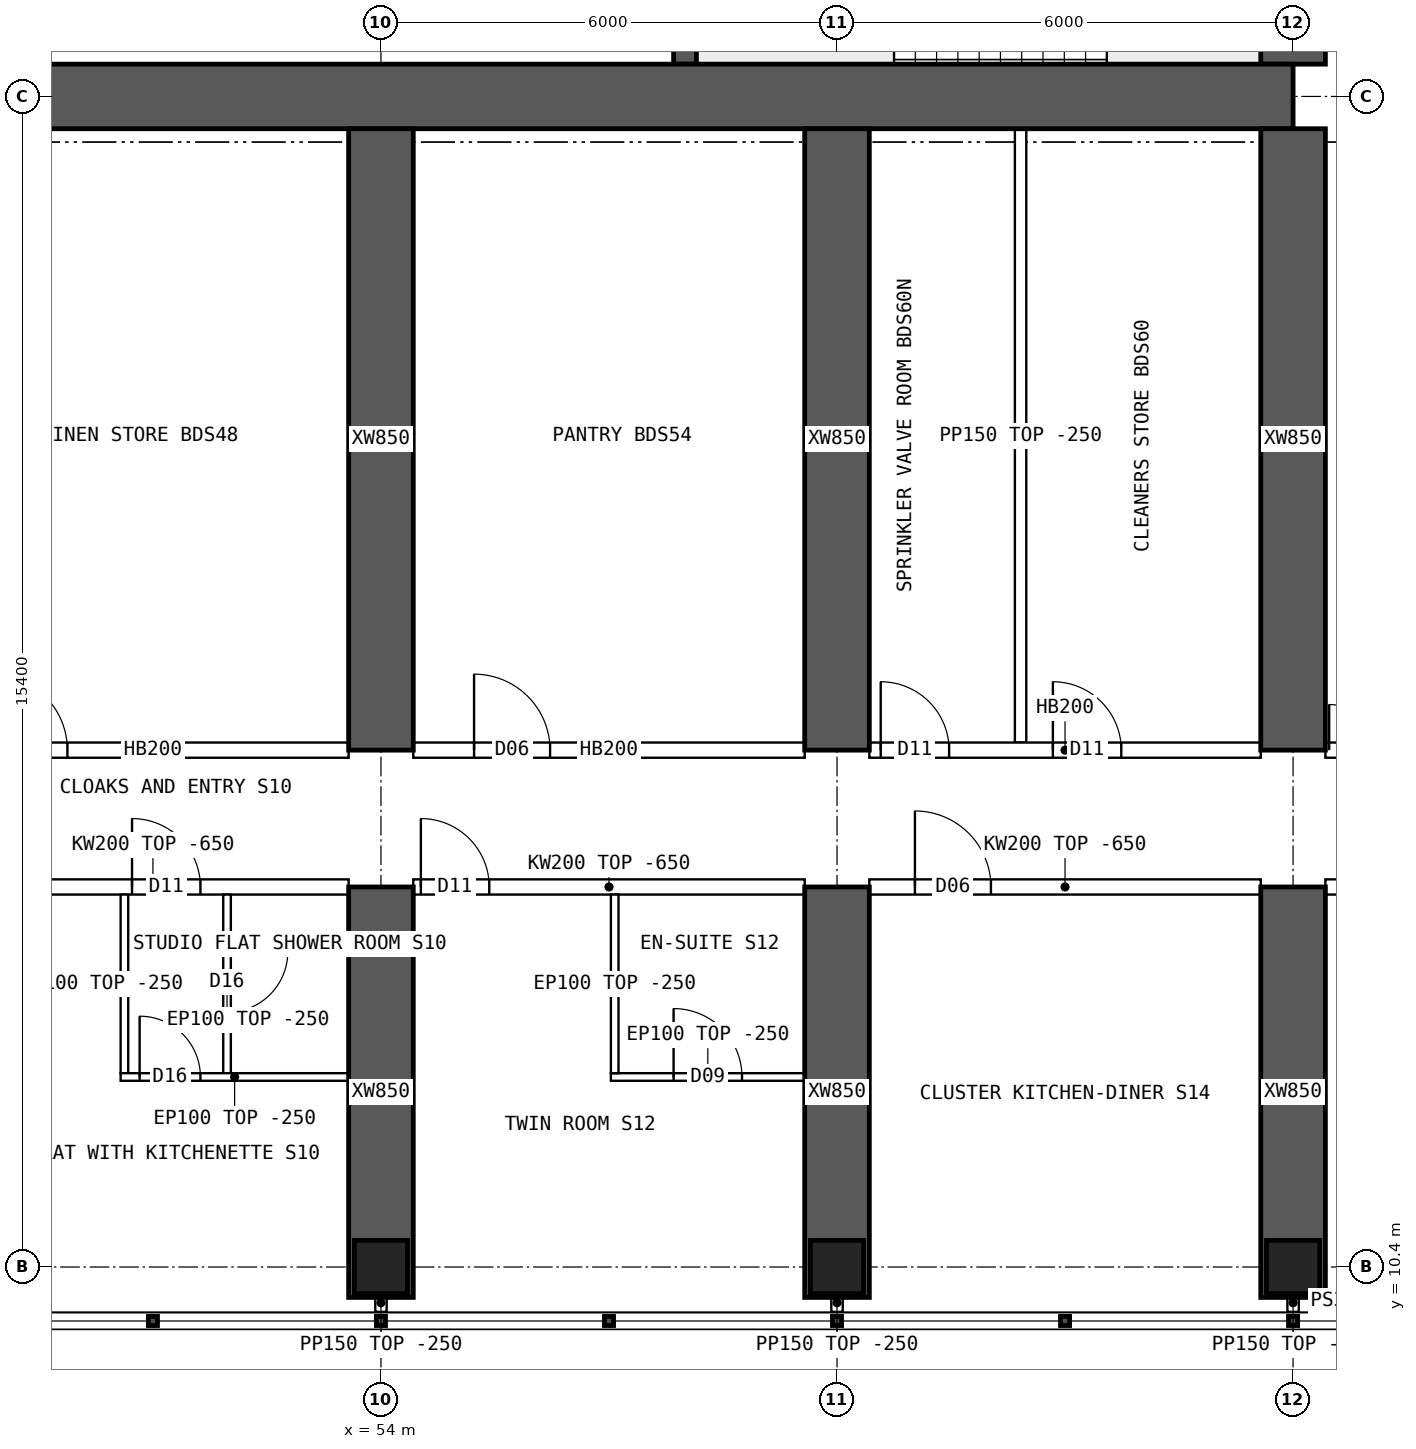
"""IFC4 building model, lengths in metres.
Left out: names, types, materials, properties, quantities, classifications, styles, units other than length and angle.
Written with IfcOpenShell. Run it as: python <this file> out.ifc"""

import sys

from ifc_helpers import new_model, si_unit, direction, frame, frame_2d, origin, origin_2d, place, context, subcontext, project, spatial, polyline, rectangle, hollow_rectangle, outline, extrude, element, fill, save


model = new_model("IFC4")
c1 = context("Model", 3, precision=1e-05, world=origin(), true_north=direction((0.0, 1.0)))
c2 = subcontext(c1, "Body", "Model", "MODEL_VIEW")
j1 = project(units=[si_unit("LENGTHUNIT", "METRE"), si_unit("PLANEANGLEUNIT", "RADIAN")], contexts=[c1])
p1 = place(None, origin())
s1 = spatial("IfcSite", under=j1, at=p1, CompositionType="ELEMENT")
p2 = place(p1, origin())
s2 = spatial("IfcBuilding", under=s1, at=p2, CompositionType="ELEMENT")
p3 = place(p2, frame((0.0, 0.0, 148.6)))
s3 = spatial("IfcBuildingStorey", under=s2, at=p3, CompositionType="ELEMENT", Elevation=148.6)
for number, where, z_axis, x_axis in (
    (1, (54.0, 10.4, 0.0), (0.0, 0.0, 1.0), (1.0, 0.0, 0.0)),
    (2, (60.0, 10.4, 0.0), (0.0, 0.0, 1.0), (1.0, 0.0, 0.0)),
    (3, (66.0, 10.4, 0.0), (0.0, 0.0, 1.0), (1.0, 0.0, 0.0)),
):
    element("IfcColumn", number, at=place(p3, frame(where, z_axis=z_axis, x_axis=x_axis)), inside=s3, PredefinedType="COLUMN", context=c2, shape_type="SweptSolid", body=[
        extrude(hollow_rectangle(XDim=0.7, YDim=0.7, WallThickness=0.07, at=origin_2d()), origin(), (0.0, 0.0, 1.0), 3.75),
    ])
p4 = place(p3, frame((18.0, 25.8, 0.0), z_axis=(0.0, 0.0, 1.0), x_axis=(1.0, 0.0, 0.0)))
e4 = element("IfcWall", 4, at=p4, inside=s3, PredefinedType="SHEAR", context=c2, shape_type="SweptSolid", body=[
    extrude(rectangle(XDim=48.0, YDim=0.85, at=frame_2d((24.0, 0.0))), origin(), (0.0, 0.0, 1.0), 3.75),
])
p5 = place(p3, frame((66.0, 26.225, 0.0), z_axis=(0.0, 0.0, 1.0), x_axis=(0.0, 1.0, 0.0)))
e5 = element("IfcWall", 5, at=p5, inside=s3, PredefinedType="SHEAR", context=c2, shape_type="SweptSolid", body=[
    extrude(rectangle(XDim=11.55, YDim=0.85, at=frame_2d((5.775, 0.0))), origin(), (0.0, 0.0, 1.0), 3.75),
])
p6 = place(p5, frame((5.075, 0.0, 0.0)))
e6 = element("IfcOpeningElement", 6, at=p6, cuts=e5, PredefinedType="OPENING", context=c2, shape_type="SweptSolid", body=[
    extrude(rectangle(XDim=1.2, YDim=2.1, at=frame_2d((0.6, 1.05))), frame((0.0, 0.435, 0.0), z_axis=(0.0, -1.0, 0.0), x_axis=(1.0, 0.0, 0.0)), (0.0, 0.0, 1.0), 0.87),
])
p7 = place(p3, frame((58.0, 26.225, 0.0), z_axis=(0.0, 0.0, 1.0), x_axis=(0.0, 1.0, 0.0)))
e7 = element("IfcWall", 7, at=p7, inside=s3, PredefinedType="SHEAR", context=c2, shape_type="SweptSolid", body=[
    extrude(rectangle(XDim=4.025, YDim=0.3, at=frame_2d((2.012, 0.0))), origin(), (0.0, 0.0, 1.0), 3.75),
])
p8 = place(p3, frame((54.0, 10.0, 0.0), z_axis=(0.0, 0.0, 1.0), x_axis=(0.0, 1.0, 0.0)))
e8 = element("IfcWall", 8, at=p8, inside=s3, PredefinedType="SHEAR", context=c2, shape_type="SweptSolid", body=[
    extrude(rectangle(XDim=5.4, YDim=0.85, at=frame_2d((2.7, 0.0))), origin(), (0.0, 0.0, 1.0), 3.75),
])
p9 = place(p3, frame((54.0, 17.2, 0.0), z_axis=(0.0, 0.0, 1.0), x_axis=(0.0, 1.0, 0.0)))
e9 = element("IfcWall", 9, at=p9, inside=s3, PredefinedType="SHEAR", context=c2, shape_type="SweptSolid", body=[
    extrude(rectangle(XDim=8.175, YDim=0.85, at=frame_2d((4.087, 0.0))), origin(), (0.0, 0.0, 1.0), 3.75),
])
p10 = place(p3, frame((60.0, 10.0, 0.0), z_axis=(0.0, 0.0, 1.0), x_axis=(0.0, 1.0, 0.0)))
e10 = element("IfcWall", 10, at=p10, inside=s3, PredefinedType="SHEAR", context=c2, shape_type="SweptSolid", body=[
    extrude(rectangle(XDim=5.4, YDim=0.85, at=frame_2d((2.7, 0.0))), origin(), (0.0, 0.0, 1.0), 3.75),
])
p11 = place(p3, frame((60.0, 17.2, 0.0), z_axis=(0.0, 0.0, 1.0), x_axis=(0.0, 1.0, 0.0)))
e11 = element("IfcWall", 11, at=p11, inside=s3, PredefinedType="SHEAR", context=c2, shape_type="SweptSolid", body=[
    extrude(rectangle(XDim=8.175, YDim=0.85, at=frame_2d((4.087, 0.0))), origin(), (0.0, 0.0, 1.0), 3.75),
])
p12 = place(p3, frame((66.0, 10.0, 0.0), z_axis=(0.0, 0.0, 1.0), x_axis=(0.0, 1.0, 0.0)))
e12 = element("IfcWall", 12, at=p12, inside=s3, PredefinedType="SHEAR", context=c2, shape_type="SweptSolid", body=[
    extrude(rectangle(XDim=5.4, YDim=0.85, at=frame_2d((2.7, 0.0))), origin(), (0.0, 0.0, 1.0), 3.75),
])
p13 = place(p3, frame((66.0, 17.2, 0.0), z_axis=(0.0, 0.0, 1.0), x_axis=(0.0, 1.0, 0.0)))
e13 = element("IfcWall", 13, at=p13, inside=s3, PredefinedType="SHEAR", context=c2, shape_type="SweptSolid", body=[
    extrude(rectangle(XDim=8.175, YDim=0.85, at=frame_2d((4.087, 0.0))), origin(), (0.0, 0.0, 1.0), 3.75),
])
p14 = place(p3, frame((66.8, 9.95, 0.0), z_axis=(0.0, 0.0, 1.0), x_axis=(-1.0, 0.0, 0.0)))
e14 = element("IfcWall", 14, at=p14, inside=s3, PredefinedType="SOLIDWALL", context=c2, shape_type="SweptSolid", body=[
    extrude(rectangle(XDim=0.375, YDim=0.3, at=frame_2d((0.188, 0.0))), origin(), (0.0, 0.0, 1.0), 3.5),
])
p15 = place(p3, frame((48.425, 15.4, 0.0), z_axis=(0.0, 0.0, 1.0), x_axis=(1.0, 0.0, 0.0)))
e15 = element("IfcWall", 15, at=p15, inside=s3, PredefinedType="SOLIDWALL", context=c2, shape_type="SweptSolid", body=[
    extrude(outline(polyline([(0.0, 0.0), (5.15, 0.0), (5.15, 3.1), (0.0, 3.1), (0.0, 0.0)])), frame((0.0, 0.1, 0.0), z_axis=(0.0, -1.0, 0.0), x_axis=(1.0, 0.0, 0.0)), (0.0, 0.0, 1.0), 0.2),
])
p16 = place(p15, frame((2.3, 0.0, 0.0)))
e16 = element("IfcOpeningElement", 16, at=p16, cuts=e15, PredefinedType="OPENING", context=c2, shape_type="SweptSolid", body=[
    extrude(rectangle(XDim=0.9, YDim=2.1, at=frame_2d((0.45, 1.05))), frame((0.0, 0.11, 0.0), z_axis=(0.0, -1.0, 0.0), x_axis=(1.0, 0.0, 0.0)), (0.0, 0.0, 1.0), 0.22),
])
p17 = place(p3, frame((48.425, 17.2, 0.0), z_axis=(0.0, 0.0, 1.0), x_axis=(1.0, 0.0, 0.0)))
e17 = element("IfcWall", 17, at=p17, inside=s3, PredefinedType="SOLIDWALL", context=c2, shape_type="SweptSolid", body=[
    extrude(rectangle(XDim=5.15, YDim=0.2, at=frame_2d((2.575, 0.0))), origin(), (0.0, 0.0, 1.0), 3.5),
])
p18 = place(p17, frame((0.45, 0.0, 0.0)))
e18 = element("IfcOpeningElement", 18, at=p18, cuts=e17, PredefinedType="OPENING", context=c2, shape_type="SweptSolid", body=[
    extrude(rectangle(XDim=1.0, YDim=2.1, at=frame_2d((0.5, 1.05))), frame((0.0, 0.11, 0.0), z_axis=(0.0, -1.0, 0.0), x_axis=(1.0, 0.0, 0.0)), (0.0, 0.0, 1.0), 0.22),
])
p19 = place(p3, frame((54.425, 15.4, 0.0), z_axis=(0.0, 0.0, 1.0), x_axis=(1.0, 0.0, 0.0)))
e19 = element("IfcWall", 19, at=p19, inside=s3, PredefinedType="SOLIDWALL", context=c2, shape_type="SweptSolid", body=[
    extrude(outline(polyline([(0.0, 0.0), (5.15, 0.0), (5.15, 3.1), (0.0, 3.1), (0.0, 0.0)])), frame((0.0, 0.1, 0.0), z_axis=(0.0, -1.0, 0.0), x_axis=(1.0, 0.0, 0.0)), (0.0, 0.0, 1.0), 0.2),
])
p20 = place(p19, frame((0.1, 0.0, 0.0)))
e20 = element("IfcOpeningElement", 20, at=p20, cuts=e19, PredefinedType="OPENING", context=c2, shape_type="SweptSolid", body=[
    extrude(rectangle(XDim=0.9, YDim=2.1, at=frame_2d((0.45, 1.05))), frame((0.0, 0.11, 0.0), z_axis=(0.0, -1.0, 0.0), x_axis=(1.0, 0.0, 0.0)), (0.0, 0.0, 1.0), 0.22),
])
p21 = place(p3, frame((54.425, 17.2, 0.0), z_axis=(0.0, 0.0, 1.0), x_axis=(1.0, 0.0, 0.0)))
e21 = element("IfcWall", 21, at=p21, inside=s3, PredefinedType="SOLIDWALL", context=c2, shape_type="SweptSolid", body=[
    extrude(rectangle(XDim=5.15, YDim=0.2, at=frame_2d((2.575, 0.0))), origin(), (0.0, 0.0, 1.0), 3.5),
])
p22 = place(p21, frame((0.8, 0.0, 0.0)))
e22 = element("IfcOpeningElement", 22, at=p22, cuts=e21, PredefinedType="OPENING", context=c2, shape_type="SweptSolid", body=[
    extrude(rectangle(XDim=1.0, YDim=2.1, at=frame_2d((0.5, 1.05))), frame((0.0, 0.11, 0.0), z_axis=(0.0, -1.0, 0.0), x_axis=(1.0, 0.0, 0.0)), (0.0, 0.0, 1.0), 0.22),
])
p23 = place(p3, frame((60.425, 15.4, 0.0), z_axis=(0.0, 0.0, 1.0), x_axis=(1.0, 0.0, 0.0)))
e23 = element("IfcWall", 23, at=p23, inside=s3, PredefinedType="SOLIDWALL", context=c2, shape_type="SweptSolid", body=[
    extrude(outline(polyline([(0.0, 0.0), (5.15, 0.0), (5.15, 3.1), (0.0, 3.1), (0.0, 0.0)])), frame((0.0, 0.1, 0.0), z_axis=(0.0, -1.0, 0.0), x_axis=(1.0, 0.0, 0.0)), (0.0, 0.0, 1.0), 0.2),
])
p24 = place(p23, frame((0.6, 0.0, 0.0)))
e24 = element("IfcOpeningElement", 24, at=p24, cuts=e23, PredefinedType="OPENING", context=c2, shape_type="SweptSolid", body=[
    extrude(rectangle(XDim=1.0, YDim=2.1, at=frame_2d((0.5, 1.05))), frame((0.0, 0.11, 0.0), z_axis=(0.0, -1.0, 0.0), x_axis=(1.0, 0.0, 0.0)), (0.0, 0.0, 1.0), 0.22),
])
p25 = place(p3, frame((60.425, 17.2, 0.0), z_axis=(0.0, 0.0, 1.0), x_axis=(1.0, 0.0, 0.0)))
e25 = element("IfcWall", 25, at=p25, inside=s3, PredefinedType="SOLIDWALL", context=c2, shape_type="SweptSolid", body=[
    extrude(rectangle(XDim=5.15, YDim=0.2, at=frame_2d((2.575, 0.0))), origin(), (0.0, 0.0, 1.0), 3.5),
])
p26 = place(p25, frame((0.15, 0.0, 0.0)))
e26 = element("IfcOpeningElement", 26, at=p26, cuts=e25, PredefinedType="OPENING", context=c2, shape_type="SweptSolid", body=[
    extrude(rectangle(XDim=0.9, YDim=2.1, at=frame_2d((0.45, 1.05))), frame((0.0, 0.11, 0.0), z_axis=(0.0, -1.0, 0.0), x_axis=(1.0, 0.0, 0.0)), (0.0, 0.0, 1.0), 0.22),
])
p27 = place(p25, frame((2.415, 0.0, 0.0)))
e27 = element("IfcOpeningElement", 27, at=p27, cuts=e25, PredefinedType="OPENING", context=c2, shape_type="SweptSolid", body=[
    extrude(rectangle(XDim=0.9, YDim=2.1, at=frame_2d((0.45, 1.05))), frame((0.0, 0.11, 0.0), z_axis=(0.0, -1.0, 0.0), x_axis=(1.0, 0.0, 0.0)), (0.0, 0.0, 1.0), 0.22),
])
p28 = place(p3, frame((66.425, 15.4, 0.0), z_axis=(0.0, 0.0, 1.0), x_axis=(1.0, 0.0, 0.0)))
e28 = element("IfcWall", 28, at=p28, inside=s3, PredefinedType="SOLIDWALL", context=c2, shape_type="SweptSolid", body=[
    extrude(rectangle(XDim=1.975, YDim=0.2, at=frame_2d((0.987, 0.0))), origin(), (0.0, 0.0, 1.0), 3.5),
])
p29 = place(p28, frame((0.2, 0.0, 0.0)))
e29 = element("IfcOpeningElement", 29, at=p29, cuts=e28, PredefinedType="OPENING", context=c2, shape_type="SweptSolid", body=[
    extrude(rectangle(XDim=0.9, YDim=2.1, at=frame_2d((0.45, 1.05))), frame((0.0, 0.11, 0.0), z_axis=(0.0, -1.0, 0.0), x_axis=(1.0, 0.0, 0.0)), (0.0, 0.0, 1.0), 0.22),
])
p30 = place(p3, frame((66.425, 17.2, 0.0), z_axis=(0.0, 0.0, 1.0), x_axis=(1.0, 0.0, 0.0)))
e30 = element("IfcWall", 30, at=p30, inside=s3, PredefinedType="SOLIDWALL", context=c2, shape_type="SweptSolid", body=[
    extrude(rectangle(XDim=1.975, YDim=0.2, at=frame_2d((0.987, 0.0))), origin(), (0.0, 0.0, 1.0), 3.5),
])
p31 = place(p30, frame((0.05, 0.0, 0.0)))
e31 = element("IfcOpeningElement", 31, at=p31, cuts=e30, PredefinedType="OPENING", context=c2, shape_type="SweptSolid", body=[
    extrude(rectangle(XDim=1.2, YDim=2.1, at=frame_2d((0.6, 1.05))), frame((0.0, 0.11, 0.0), z_axis=(0.0, -1.0, 0.0), x_axis=(1.0, 0.0, 0.0)), (0.0, 0.0, 1.0), 0.22),
])
p32 = place(p3, frame((53.575, 12.9, 0.0), z_axis=(0.0, 0.0, 1.0), x_axis=(-1.0, 0.0, 0.0)))
e32 = element("IfcWall", 32, at=p32, inside=s3, PredefinedType="PARTITIONING", context=c2, shape_type="SweptSolid", body=[
    extrude(rectangle(XDim=3.0, YDim=0.1, at=frame_2d((1.5, 0.0))), origin(), (0.0, 0.0, 1.0), 3.5),
])
p33 = place(p32, frame((1.95, 0.0, 0.0)))
e33 = element("IfcOpeningElement", 33, at=p33, cuts=e32, PredefinedType="OPENING", context=c2, shape_type="SweptSolid", body=[
    extrude(rectangle(XDim=0.8, YDim=2.1, at=frame_2d((0.4, 1.05))), frame((0.0, 0.06, 0.0), z_axis=(0.0, -1.0, 0.0), x_axis=(1.0, 0.0, 0.0)), (0.0, 0.0, 1.0), 0.12),
])
p34 = place(p3, frame((50.625, 12.95, 0.0), z_axis=(0.0, 0.0, 1.0), x_axis=(0.0, 1.0, 0.0)))
e34 = element("IfcWall", 34, at=p34, inside=s3, PredefinedType="PARTITIONING", context=c2, shape_type="SweptSolid", body=[
    extrude(outline(polyline([(0.0, 0.0), (2.35, 0.0), (2.35, 3.1), (2.302, 3.1), (2.3, 3.5), (0.0, 3.5), (0.0, 0.0)])), frame((0.0, 0.05, 0.0), z_axis=(0.0, -1.0, 0.0), x_axis=(1.0, 0.0, 0.0)), (0.0, 0.0, 1.0), 0.1),
])
p35 = place(p3, frame((51.975, 12.95, 0.0), z_axis=(0.0, 0.0, 1.0), x_axis=(0.0, 1.0, 0.0)))
e35 = element("IfcWall", 35, at=p35, inside=s3, PredefinedType="PARTITIONING", context=c2, shape_type="SweptSolid", body=[
    extrude(outline(polyline([(0.0, 0.0), (2.35, 0.0), (2.35, 3.1), (2.302, 3.1), (2.3, 3.5), (0.0, 3.5), (0.0, 0.0)])), frame((0.0, 0.05, 0.0), z_axis=(0.0, -1.0, 0.0), x_axis=(1.0, 0.0, 0.0)), (0.0, 0.0, 1.0), 0.1),
])
p36 = place(p35, frame((0.8, 0.0, 0.0)))
e36 = element("IfcOpeningElement", 36, at=p36, cuts=e35, PredefinedType="OPENING", context=c2, shape_type="SweptSolid", body=[
    extrude(rectangle(XDim=0.8, YDim=2.1, at=frame_2d((0.4, 1.05))), frame((0.0, 0.06, 0.0), z_axis=(0.0, -1.0, 0.0), x_axis=(1.0, 0.0, 0.0)), (0.0, 0.0, 1.0), 0.12),
])
p37 = place(p3, frame((59.575, 12.9, 0.0), z_axis=(0.0, 0.0, 1.0), x_axis=(-1.0, 0.0, 0.0)))
e37 = element("IfcWall", 37, at=p37, inside=s3, PredefinedType="PARTITIONING", context=c2, shape_type="SweptSolid", body=[
    extrude(rectangle(XDim=2.55, YDim=0.1, at=frame_2d((1.275, 0.0))), origin(), (0.0, 0.0, 1.0), 3.5),
])
p38 = place(p37, frame((0.825, 0.0, 0.0)))
e38 = element("IfcOpeningElement", 38, at=p38, cuts=e37, PredefinedType="OPENING", context=c2, shape_type="SweptSolid", body=[
    extrude(rectangle(XDim=0.9, YDim=2.1, at=frame_2d((0.45, 1.05))), frame((0.0, 0.06, 0.0), z_axis=(0.0, -1.0, 0.0), x_axis=(1.0, 0.0, 0.0)), (0.0, 0.0, 1.0), 0.12),
])
p39 = place(p3, frame((57.075, 12.95, 0.0), z_axis=(0.0, 0.0, 1.0), x_axis=(0.0, 1.0, 0.0)))
e39 = element("IfcWall", 39, at=p39, inside=s3, PredefinedType="PARTITIONING", context=c2, shape_type="SweptSolid", body=[
    extrude(outline(polyline([(0.0, 0.0), (2.35, 0.0), (2.35, 3.1), (2.302, 3.1), (2.3, 3.5), (0.0, 3.5), (0.0, 0.0)])), frame((0.0, 0.05, 0.0), z_axis=(0.0, -1.0, 0.0), x_axis=(1.0, 0.0, 0.0)), (0.0, 0.0, 1.0), 0.1),
])
p40 = place(p3, frame((62.415, 17.3, 0.0), z_axis=(0.0, 0.0, 1.0), x_axis=(0.0, 1.0, 0.0)))
e40 = element("IfcWall", 40, at=p40, inside=s3, PredefinedType="PARTITIONING", context=c2, shape_type="SweptSolid", body=[
    extrude(rectangle(XDim=8.075, YDim=0.15, at=frame_2d((4.038, 0.0))), origin(), (0.0, 0.0, 1.0), 3.5),
])
for number, where, z_axis, x_axis in (
    (41, (54.0, 10.05, 0.0), (0.0, 0.0, 1.0), (0.0, -1.0, 0.0)),
    (42, (60.0, 10.05, 0.0), (0.0, 0.0, 1.0), (0.0, -1.0, 0.0)),
    (43, (66.0, 10.05, 0.0), (0.0, 0.0, 1.0), (0.0, -1.0, 0.0)),
):
    element("IfcWall", number, at=place(p3, frame(where, z_axis=z_axis, x_axis=x_axis)), inside=s3, PredefinedType="PARTITIONING", context=c2, shape_type="SweptSolid", body=[
        extrude(rectangle(XDim=0.24, YDim=0.15, at=frame_2d((0.12, 0.0))), origin(), (0.0, 0.0, 1.0), 3.5),
    ])
p41 = place(p31, origin())
e44 = element("IfcDoor", 44, at=p41, inside=s3, OperationType="DOUBLE_DOOR_SINGLE_SWING", PredefinedType="DOOR", context=c2, shape_type="SweptSolid", body=[
    extrude(rectangle(XDim=1.2, YDim=2.1, at=frame_2d((0.6, 1.05))), frame((0.0, 0.025, 0.0), z_axis=(0.0, -1.0, 0.0), x_axis=(1.0, 0.0, 0.0)), (0.0, 0.0, 1.0), 0.05),
])
fill(e31, e44)
p42 = place(p33, origin())
e45 = element("IfcDoor", 45, at=p42, inside=s3, OperationType="SINGLE_SWING_RIGHT", PredefinedType="DOOR", context=c2, shape_type="SweptSolid", body=[
    extrude(rectangle(XDim=0.8, YDim=2.1, at=frame_2d((0.4, 1.05))), frame((0.0, 0.025, 0.0), z_axis=(0.0, -1.0, 0.0), x_axis=(1.0, 0.0, 0.0)), (0.0, 0.0, 1.0), 0.05),
])
fill(e33, e45)
p43 = place(p36, origin())
e46 = element("IfcDoor", 46, at=p43, inside=s3, OperationType="SINGLE_SWING_RIGHT", PredefinedType="DOOR", context=c2, shape_type="SweptSolid", body=[
    extrude(rectangle(XDim=0.8, YDim=2.1, at=frame_2d((0.4, 1.05))), frame((0.0, 0.025, 0.0), z_axis=(0.0, -1.0, 0.0), x_axis=(1.0, 0.0, 0.0)), (0.0, 0.0, 1.0), 0.05),
])
fill(e36, e46)
p44 = place(p16, origin())
e47 = element("IfcDoor", 47, at=p44, inside=s3, OperationType="SINGLE_SWING_LEFT", PredefinedType="DOOR", context=c2, shape_type="SweptSolid", body=[
    extrude(rectangle(XDim=0.9, YDim=2.1, at=frame_2d((0.45, 1.05))), frame((0.0, 0.025, 0.0), z_axis=(0.0, -1.0, 0.0), x_axis=(1.0, 0.0, 0.0)), (0.0, 0.0, 1.0), 0.05),
])
fill(e16, e47)
p45 = place(p38, origin())
e48 = element("IfcDoor", 48, at=p45, inside=s3, OperationType="SINGLE_SWING_RIGHT", PredefinedType="DOOR", context=c2, shape_type="SweptSolid", body=[
    extrude(rectangle(XDim=0.9, YDim=2.1, at=frame_2d((0.45, 1.05))), frame((0.0, 0.025, 0.0), z_axis=(0.0, -1.0, 0.0), x_axis=(1.0, 0.0, 0.0)), (0.0, 0.0, 1.0), 0.05),
])
fill(e38, e48)
p46 = place(p20, origin())
e49 = element("IfcDoor", 49, at=p46, inside=s3, OperationType="SINGLE_SWING_LEFT", PredefinedType="DOOR", context=c2, shape_type="SweptSolid", body=[
    extrude(rectangle(XDim=0.9, YDim=2.1, at=frame_2d((0.45, 1.05))), frame((0.0, 0.025, 0.0), z_axis=(0.0, -1.0, 0.0), x_axis=(1.0, 0.0, 0.0)), (0.0, 0.0, 1.0), 0.05),
])
fill(e20, e49)
p47 = place(p24, origin())
e50 = element("IfcDoor", 50, at=p47, inside=s3, OperationType="SINGLE_SWING_LEFT", PredefinedType="DOOR", context=c2, shape_type="SweptSolid", body=[
    extrude(rectangle(XDim=1.0, YDim=2.1, at=frame_2d((0.5, 1.05))), frame((0.0, 0.025, 0.0), z_axis=(0.0, -1.0, 0.0), x_axis=(1.0, 0.0, 0.0)), (0.0, 0.0, 1.0), 0.05),
])
fill(e24, e50)
p48 = place(p18, origin())
e51 = element("IfcDoor", 51, at=p48, inside=s3, OperationType="SINGLE_SWING_LEFT", PredefinedType="DOOR", context=c2, shape_type="SweptSolid", body=[
    extrude(rectangle(XDim=1.0, YDim=2.1, at=frame_2d((0.5, 1.05))), frame((0.0, 0.025, 0.0), z_axis=(0.0, -1.0, 0.0), x_axis=(1.0, 0.0, 0.0)), (0.0, 0.0, 1.0), 0.05),
])
fill(e18, e51)
p49 = place(p22, origin())
e52 = element("IfcDoor", 52, at=p49, inside=s3, OperationType="SINGLE_SWING_LEFT", PredefinedType="DOOR", context=c2, shape_type="SweptSolid", body=[
    extrude(rectangle(XDim=1.0, YDim=2.1, at=frame_2d((0.5, 1.05))), frame((0.0, 0.025, 0.0), z_axis=(0.0, -1.0, 0.0), x_axis=(1.0, 0.0, 0.0)), (0.0, 0.0, 1.0), 0.05),
])
fill(e22, e52)
p50 = place(p26, origin())
e53 = element("IfcDoor", 53, at=p50, inside=s3, OperationType="SINGLE_SWING_LEFT", PredefinedType="DOOR", context=c2, shape_type="SweptSolid", body=[
    extrude(rectangle(XDim=0.9, YDim=2.1, at=frame_2d((0.45, 1.05))), frame((0.0, 0.025, 0.0), z_axis=(0.0, -1.0, 0.0), x_axis=(1.0, 0.0, 0.0)), (0.0, 0.0, 1.0), 0.05),
])
fill(e26, e53)
p51 = place(p27, origin())
e54 = element("IfcDoor", 54, at=p51, inside=s3, OperationType="SINGLE_SWING_LEFT", PredefinedType="DOOR", context=c2, shape_type="SweptSolid", body=[
    extrude(rectangle(XDim=0.9, YDim=2.1, at=frame_2d((0.45, 1.05))), frame((0.0, 0.025, 0.0), z_axis=(0.0, -1.0, 0.0), x_axis=(1.0, 0.0, 0.0)), (0.0, 0.0, 1.0), 0.05),
])
fill(e27, e54)
save(model, sys.argv[1])
